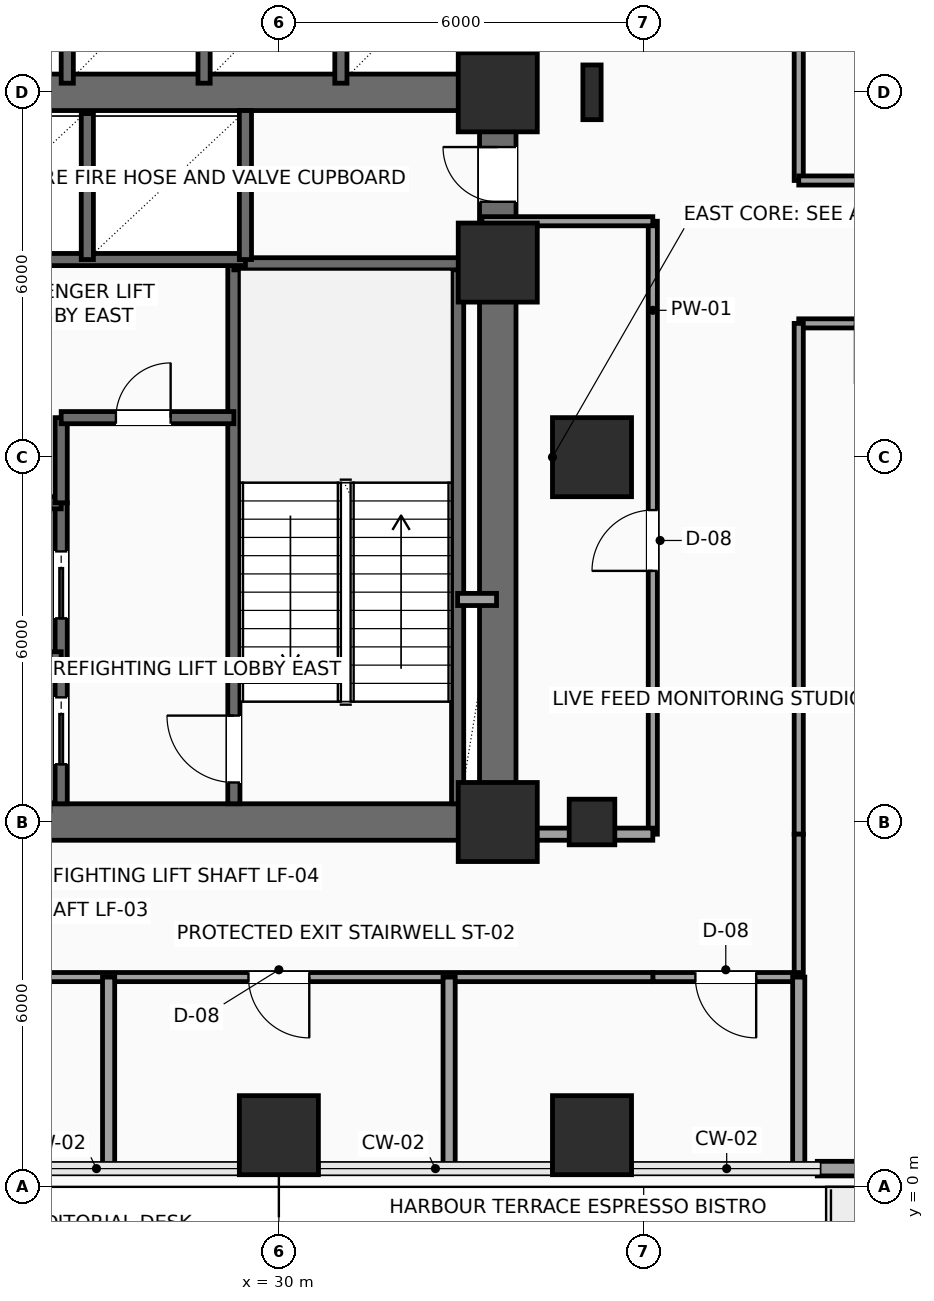
"""IFC4 building model, lengths in metres.
Left out: names, types, materials, properties, quantities, classifications, styles, units other than length and angle.
Written with IfcOpenShell. Run it as: python <this file> out.ifc"""

import sys

from ifc_helpers import new_model, si_unit, direction, frame, frame_2d, origin, origin_2d, place, context, subcontext, project, spatial, rectangle, hollow_rectangle, i_section, extrude, element, fill, save


model = new_model("IFC4")
c1 = context("Model", 3, precision=1e-05, world=origin(), true_north=direction((0.0, 1.0)))
c2 = subcontext(c1, "Body", "Model", "MODEL_VIEW")
j1 = project(units=[si_unit("LENGTHUNIT", "METRE"), si_unit("PLANEANGLEUNIT", "RADIAN")], contexts=[c1])
p1 = place(None, origin())
s1 = spatial("IfcSite", under=j1, at=p1, CompositionType="ELEMENT")
p2 = place(p1, origin())
s2 = spatial("IfcBuilding", under=s1, at=p2, CompositionType="ELEMENT")
p3 = place(p2, frame((0.0, 0.0, 71.4)))
s3 = spatial("IfcBuildingStorey", under=s2, at=p3, CompositionType="ELEMENT", Elevation=71.4)
for number, where, z_axis, x_axis in (
    (1, (33.6, 6.0, 0.0), (0.0, 0.0, 1.0), (1.0, 0.0, 0.0)),
    (2, (33.6, 15.2, 0.0), (0.0, 0.0, 1.0), (1.0, 0.0, 0.0)),
    (3, (33.6, 18.0, 0.0), (0.0, 0.0, 1.0), (1.0, 0.0, 0.0)),
    (4, (30.0, 0.85, 0.0), (0.0, 0.0, 1.0), (1.0, 0.0, 0.0)),
    (5, (35.15, 0.85, 0.0), (0.0, 0.0, 1.0), (1.0, 0.0, 0.0)),
):
    element("IfcColumn", number, at=place(p3, frame(where, z_axis=z_axis, x_axis=x_axis)), inside=s3, PredefinedType="COLUMN", context=c2, shape_type="SweptSolid", body=[
        extrude(rectangle(XDim=1.3, YDim=1.3, at=origin_2d()), origin(), (0.0, 0.0, 1.0), 3.9),
    ])
p4 = place(p3, frame((35.15, 6.0, 0.0), z_axis=(0.0, 0.0, 1.0), x_axis=(1.0, 0.0, 0.0)))
e6 = element("IfcColumn", 6, at=p4, inside=s3, PredefinedType="COLUMN", context=c2, shape_type="SweptSolid", body=[
    extrude(hollow_rectangle(XDim=0.75, YDim=0.75, WallThickness=0.035, InnerFilletRadius=0.035, OuterFilletRadius=0.05, at=origin_2d()), origin(), (0.0, 0.0, 1.0), 3.9),
])
p5 = place(p3, frame((35.15, 12.0, 0.0), z_axis=(0.0, 0.0, 1.0), x_axis=(1.0, 0.0, 0.0)))
e7 = element("IfcColumn", 7, at=p5, inside=s3, PredefinedType="COLUMN", context=c2, shape_type="SweptSolid", body=[
    extrude(rectangle(XDim=1.3, YDim=1.3, at=origin_2d()), origin(), (0.0, 0.0, 1.0), 3.9),
])
p6 = place(p3, frame((35.15, 18.0, 0.0), z_axis=(0.0, 0.0, 1.0), x_axis=(1.0, 0.0, 0.0)))
e8 = element("IfcColumn", 8, at=p6, inside=s3, PredefinedType="COLUMN", context=c2, shape_type="SweptSolid", body=[
    extrude(i_section(OverallWidth=0.3, OverallDepth=0.9, WebThickness=0.019, FlangeThickness=0.035, FilletRadius=0.03, at=origin_2d()), origin(), (0.0, 0.0, 1.0), 3.9),
])
p7 = place(p3, frame((48.145, 0.3, 0.0), z_axis=(0.0, 0.0, 1.0), x_axis=(-1.0, 0.0, 0.0)))
e9 = element("IfcWall", 9, at=p7, inside=s3, PredefinedType="SOLIDWALL", context=c2, shape_type="SweptSolid", body=[
    extrude(rectangle(XDim=9.29, YDim=0.24, at=frame_2d((4.645, 0.0))), origin(), (0.0, 0.0, 1.0), 3.65),
])
p8 = place(p7, frame((3.945, 0.0, 0.0)))
e10 = element("IfcOpeningElement", 10, at=p8, cuts=e9, PredefinedType="OPENING", context=c2, shape_type="SweptSolid", body=[
    extrude(rectangle(XDim=1.05, YDim=2.2, at=frame_2d((0.525, 1.1))), frame((0.0, 0.13, 0.0), z_axis=(0.0, -1.0, 0.0), x_axis=(1.0, 0.0, 0.0)), (0.0, 0.0, 1.0), 0.26),
])
for number, where, z_axis, x_axis in (
    (11, (24.0, 6.0, 0.0), (0.0, 0.0, 1.0), (1.0, 0.0, 0.0)),
    (12, (24.0, 18.0, 0.0), (0.0, 0.0, 1.0), (1.0, 0.0, 0.0)),
):
    element("IfcWall", number, at=place(p3, frame(where, z_axis=z_axis, x_axis=x_axis)), inside=s3, PredefinedType="SHEAR", context=c2, shape_type="SweptSolid", body=[
        extrude(rectangle(XDim=9.6, YDim=0.6, at=frame_2d((4.8, 0.0))), origin(), (0.0, 0.0, 1.0), 3.65),
    ])
p9 = place(p3, frame((33.6, 6.0, 0.0), z_axis=(0.0, 0.0, 1.0), x_axis=(0.0, 1.0, 0.0)))
e13 = element("IfcWall", 13, at=p9, inside=s3, PredefinedType="SHEAR", context=c2, shape_type="SweptSolid", body=[
    extrude(rectangle(XDim=12.0, YDim=0.6, at=frame_2d((6.0, 0.0))), origin(), (0.0, 0.0, 1.0), 3.65),
])
p10 = place(p9, frame((10.2, 0.0, 0.0)))
e14 = element("IfcOpeningElement", 14, at=p10, cuts=e13, PredefinedType="OPENING", context=c2, shape_type="SweptSolid", body=[
    extrude(rectangle(XDim=0.9, YDim=2.15, at=frame_2d((0.45, 1.075))), frame((0.0, 0.31, 0.0), z_axis=(0.0, -1.0, 0.0), x_axis=(1.0, 0.0, 0.0)), (0.0, 0.0, 1.0), 0.62),
])
p11 = place(p3, frame((29.26, 6.3, 0.0), z_axis=(0.0, 0.0, 1.0), x_axis=(0.0, 1.0, 0.0)))
e15 = element("IfcWall", 15, at=p11, inside=s3, PredefinedType="SHEAR", context=c2, shape_type="SweptSolid", body=[
    extrude(rectangle(XDim=8.88, YDim=0.2, at=frame_2d((4.44, 0.0))), origin(), (0.0, 0.0, 1.0), 3.65),
])
p12 = place(p11, frame((0.35, 0.0, 0.0)))
e16 = element("IfcOpeningElement", 16, at=p12, cuts=e15, PredefinedType="OPENING", context=c2, shape_type="SweptSolid", body=[
    extrude(rectangle(XDim=1.1, YDim=2.2, at=frame_2d((0.55, 1.1))), frame((0.0, 0.11, 0.0), z_axis=(0.0, -1.0, 0.0), x_axis=(1.0, 0.0, 0.0)), (0.0, 0.0, 1.0), 0.22),
])
p13 = place(p3, frame((32.94, 6.3, 0.0), z_axis=(0.0, 0.0, 1.0), x_axis=(0.0, 1.0, 0.0)))
e17 = element("IfcWall", 17, at=p13, inside=s3, PredefinedType="SHEAR", context=c2, shape_type="SweptSolid", body=[
    extrude(rectangle(XDim=8.88, YDim=0.2, at=frame_2d((4.44, 0.0))), origin(), (0.0, 0.0, 1.0), 3.65),
])
p14 = place(p3, frame((29.26, 15.18, 0.0), z_axis=(0.0, 0.0, 1.0), x_axis=(1.0, 0.0, 0.0)))
e18 = element("IfcWall", 18, at=p14, inside=s3, PredefinedType="SHEAR", context=c2, shape_type="SweptSolid", body=[
    extrude(rectangle(XDim=4.04, YDim=0.2, at=frame_2d((2.02, 0.0))), origin(), (0.0, 0.0, 1.0), 3.65),
])
p15 = place(p3, frame((26.42, 6.3, 0.0), z_axis=(0.0, 0.0, 1.0), x_axis=(0.0, 1.0, 0.0)))
e19 = element("IfcWall", 19, at=p15, inside=s3, PredefinedType="SHEAR", context=c2, shape_type="SweptSolid", body=[
    extrude(rectangle(XDim=4.95, YDim=0.2, at=frame_2d((2.475, 0.0))), origin(), (0.0, 0.0, 1.0), 3.65),
])
p16 = place(p15, frame((0.65, 0.0, 0.0)))
e20 = element("IfcOpeningElement", 20, at=p16, cuts=e19, PredefinedType="OPENING", context=c2, shape_type="SweptSolid", body=[
    extrude(rectangle(XDim=1.1, YDim=2.2, at=frame_2d((0.55, 1.1))), frame((0.0, 0.11, 0.0), z_axis=(0.0, -1.0, 0.0), x_axis=(1.0, 0.0, 0.0)), (0.0, 0.0, 1.0), 0.22),
])
p17 = place(p15, frame((3.05, 0.0, 0.0)))
e21 = element("IfcOpeningElement", 21, at=p17, cuts=e19, PredefinedType="OPENING", context=c2, shape_type="SweptSolid", body=[
    extrude(rectangle(XDim=1.1, YDim=2.2, at=frame_2d((0.55, 1.1))), frame((0.0, 0.11, 0.0), z_axis=(0.0, -1.0, 0.0), x_axis=(1.0, 0.0, 0.0)), (0.0, 0.0, 1.0), 0.22),
])
for number, where, z_axis, x_axis in (
    (22, (24.25, 8.7, 0.0), (0.0, 0.0, 1.0), (1.0, 0.0, 0.0)),
    (23, (24.25, 11.25, 0.0), (0.0, 0.0, 1.0), (1.0, 0.0, 0.0)),
):
    element("IfcWall", number, at=place(p3, frame(where, z_axis=z_axis, x_axis=x_axis)), inside=s3, PredefinedType="SHEAR", context=c2, shape_type="SweptSolid", body=[
        extrude(rectangle(XDim=2.17, YDim=0.2, at=frame_2d((1.085, 0.0))), origin(), (0.0, 0.0, 1.0), 3.65),
    ])
p18 = place(p3, frame((26.42, 11.25, 0.0), z_axis=(0.0, 0.0, 1.0), x_axis=(0.0, 1.0, 0.0)))
e24 = element("IfcWall", 24, at=p18, inside=s3, PredefinedType="SHEAR", context=c2, shape_type="SweptSolid", body=[
    extrude(rectangle(XDim=1.4, YDim=0.2, at=frame_2d((0.7, 0.0))), origin(), (0.0, 0.0, 1.0), 3.65),
])
p19 = place(p3, frame((26.42, 12.65, 0.0), z_axis=(0.0, 0.0, 1.0), x_axis=(1.0, 0.0, 0.0)))
e25 = element("IfcWall", 25, at=p19, inside=s3, PredefinedType="SHEAR", context=c2, shape_type="SweptSolid", body=[
    extrude(rectangle(XDim=2.84, YDim=0.2, at=frame_2d((1.42, 0.0))), origin(), (0.0, 0.0, 1.0), 3.65),
])
p20 = place(p19, frame((0.9, 0.0, 0.0)))
e26 = element("IfcOpeningElement", 26, at=p20, cuts=e25, PredefinedType="OPENING", context=c2, shape_type="SweptSolid", body=[
    extrude(rectangle(XDim=0.9, YDim=2.15, at=frame_2d((0.45, 1.075))), frame((0.0, 0.11, 0.0), z_axis=(0.0, -1.0, 0.0), x_axis=(1.0, 0.0, 0.0)), (0.0, 0.0, 1.0), 0.22),
])
p21 = place(p3, frame((32.94, 9.66, 0.0), z_axis=(0.0, 0.0, 1.0), x_axis=(1.0, 0.0, 0.0)))
e27 = element("IfcWall", 27, at=p21, inside=s3, PredefinedType="SOLIDWALL", context=c2, shape_type="SweptSolid", body=[
    extrude(rectangle(XDim=0.64, YDim=0.2, at=frame_2d((0.32, 0.0))), origin(), (0.0, 0.0, 1.0), 3.65),
])
p22 = place(p3, frame((24.25, 15.25, 0.0), z_axis=(0.0, 0.0, 1.0), x_axis=(1.0, 0.0, 0.0)))
e28 = element("IfcWall", 28, at=p22, inside=s3, PredefinedType="SHEAR", context=c2, shape_type="SweptSolid", body=[
    extrude(rectangle(XDim=5.2, YDim=0.2, at=frame_2d((2.6, 0.0))), origin(), (0.0, 0.0, 1.0), 3.65),
])
p23 = place(p3, frame((26.85, 15.25, 0.0), z_axis=(0.0, 0.0, 1.0), x_axis=(0.0, 1.0, 0.0)))
e29 = element("IfcWall", 29, at=p23, inside=s3, PredefinedType="SHEAR", context=c2, shape_type="SweptSolid", body=[
    extrude(rectangle(XDim=2.4, YDim=0.2, at=frame_2d((1.2, 0.0))), origin(), (0.0, 0.0, 1.0), 3.65),
])
p24 = place(p3, frame((29.45, 15.25, 0.0), z_axis=(0.0, 0.0, 1.0), x_axis=(0.0, 1.0, 0.0)))
e30 = element("IfcWall", 30, at=p24, inside=s3, PredefinedType="SHEAR", context=c2, shape_type="SweptSolid", body=[
    extrude(rectangle(XDim=2.45, YDim=0.2, at=frame_2d((1.225, 0.0))), origin(), (0.0, 0.0, 1.0), 3.65),
])
p25 = place(p3, frame((33.3, 18.1, 0.0), z_axis=(0.0, 0.0, 1.0), x_axis=(0.0, 1.0, 0.0)))
e31 = element("IfcWall", 31, at=p25, inside=s3, PredefinedType="SHEAR", context=c2, shape_type="SweptSolid", body=[
    extrude(rectangle(XDim=2.35, YDim=0.2, at=frame_2d((1.175, 0.0))), origin(), (0.0, 0.0, 1.0), 3.65),
])
for number, where, z_axis, x_axis in (
    (32, (26.52, 18.15, 0.0), (0.0, 0.0, 1.0), (0.0, 1.0, 0.0)),
    (33, (28.77, 18.15, 0.0), (0.0, 0.0, 1.0), (0.0, 1.0, 0.0)),
    (34, (31.02, 18.15, 0.0), (0.0, 0.0, 1.0), (0.0, 1.0, 0.0)),
):
    element("IfcWall", number, at=place(p3, frame(where, z_axis=z_axis, x_axis=x_axis)), inside=s3, PredefinedType="SHEAR", context=c2, shape_type="SweptSolid", body=[
        extrude(rectangle(XDim=2.3, YDim=0.2, at=frame_2d((1.15, 0.0))), origin(), (0.0, 0.0, 1.0), 3.65),
    ])
p26 = place(p3, frame((36.15, 5.8, 0.0), z_axis=(0.0, 0.0, 1.0), x_axis=(0.0, 1.0, 0.0)))
e35 = element("IfcWall", 35, at=p26, inside=s3, PredefinedType="PARTITIONING", context=c2, shape_type="SweptSolid", body=[
    extrude(rectangle(XDim=10.08, YDim=0.15, at=frame_2d((5.04, 0.0))), origin(), (0.0, 0.0, 1.0), 3.65),
])
p27 = place(p26, frame((4.33, 0.0, 0.0)))
e36 = element("IfcOpeningElement", 36, at=p27, cuts=e35, PredefinedType="OPENING", context=c2, shape_type="SweptSolid", body=[
    extrude(rectangle(XDim=1.0, YDim=2.2, at=frame_2d((0.5, 1.1))), frame((0.0, 0.085, 0.0), z_axis=(0.0, -1.0, 0.0), x_axis=(1.0, 0.0, 0.0)), (0.0, 0.0, 1.0), 0.17),
])
p28 = place(p3, frame((36.15, 15.88, 0.0), z_axis=(0.0, 0.0, 1.0), x_axis=(-1.0, 0.0, 0.0)))
e37 = element("IfcWall", 37, at=p28, inside=s3, PredefinedType="PARTITIONING", context=c2, shape_type="SweptSolid", body=[
    extrude(rectangle(XDim=2.81, YDim=0.15, at=frame_2d((1.405, 0.0))), origin(), (0.0, 0.0, 1.0), 3.65),
])
p29 = place(p3, frame((38.55, 23.7, 0.0), z_axis=(0.0, 0.0, 1.0), x_axis=(0.0, -1.0, 0.0)))
e38 = element("IfcWall", 38, at=p29, inside=s3, PredefinedType="PARTITIONING", context=c2, shape_type="SweptSolid", body=[
    extrude(rectangle(XDim=7.15, YDim=0.15, at=frame_2d((3.575, 0.0))), origin(), (0.0, 0.0, 1.0), 3.65),
])
p30 = place(p3, frame((38.55, 16.55, 0.0), z_axis=(0.0, 0.0, 1.0), x_axis=(1.0, 0.0, 0.0)))
e39 = element("IfcWall", 39, at=p30, inside=s3, PredefinedType="PARTITIONING", context=c2, shape_type="SweptSolid", body=[
    extrude(rectangle(XDim=12.35, YDim=0.15, at=frame_2d((6.175, 0.0))), origin(), (0.0, 0.0, 1.0), 3.65),
])
p31 = place(p30, frame((3.23, 0.0, 0.0)))
e40 = element("IfcOpeningElement", 40, at=p31, cuts=e39, PredefinedType="OPENING", context=c2, shape_type="SweptSolid", body=[
    extrude(rectangle(XDim=1.0, YDim=2.2, at=frame_2d((0.5, 1.1))), frame((0.0, 0.085, 0.0), z_axis=(0.0, -1.0, 0.0), x_axis=(1.0, 0.0, 0.0)), (0.0, 0.0, 1.0), 0.17),
])
p32 = place(p30, frame((9.28, 0.0, 0.0)))
e41 = element("IfcOpeningElement", 41, at=p32, cuts=e39, PredefinedType="OPENING", context=c2, shape_type="SweptSolid", body=[
    extrude(rectangle(XDim=1.0, YDim=2.2, at=frame_2d((0.5, 1.1))), frame((0.0, 0.085, 0.0), z_axis=(0.0, -1.0, 0.0), x_axis=(1.0, 0.0, 0.0)), (0.0, 0.0, 1.0), 0.17),
])
p33 = place(p3, frame((50.9, 14.2, 0.0), z_axis=(0.0, 0.0, 1.0), x_axis=(-1.0, 0.0, 0.0)))
e42 = element("IfcWall", 42, at=p33, inside=s3, PredefinedType="PARTITIONING", context=c2, shape_type="SweptSolid", body=[
    extrude(rectangle(XDim=12.35, YDim=0.15, at=frame_2d((6.175, 0.0))), origin(), (0.0, 0.0, 1.0), 3.65),
])
p34 = place(p33, frame((10.425, 0.0, 0.0)))
e43 = element("IfcOpeningElement", 43, at=p34, cuts=e42, PredefinedType="OPENING", context=c2, shape_type="SweptSolid", body=[
    extrude(rectangle(XDim=1.0, YDim=2.2, at=frame_2d((0.5, 1.1))), frame((0.0, 0.085, 0.0), z_axis=(0.0, -1.0, 0.0), x_axis=(1.0, 0.0, 0.0)), (0.0, 0.0, 1.0), 0.17),
])
p35 = place(p33, frame((5.9, 0.0, 0.0)))
e44 = element("IfcOpeningElement", 44, at=p35, cuts=e42, PredefinedType="OPENING", context=c2, shape_type="SweptSolid", body=[
    extrude(rectangle(XDim=1.0, YDim=2.2, at=frame_2d((0.5, 1.1))), frame((0.0, 0.085, 0.0), z_axis=(0.0, -1.0, 0.0), x_axis=(1.0, 0.0, 0.0)), (0.0, 0.0, 1.0), 0.17),
])
p36 = place(p33, frame((1.15, 0.0, 0.0)))
e45 = element("IfcOpeningElement", 45, at=p36, cuts=e42, PredefinedType="OPENING", context=c2, shape_type="SweptSolid", body=[
    extrude(rectangle(XDim=1.0, YDim=2.2, at=frame_2d((0.5, 1.1))), frame((0.0, 0.085, 0.0), z_axis=(0.0, -1.0, 0.0), x_axis=(1.0, 0.0, 0.0)), (0.0, 0.0, 1.0), 0.17),
])
p37 = place(p3, frame((38.55, 14.2, 0.0), z_axis=(0.0, 0.0, 1.0), x_axis=(0.0, -1.0, 0.0)))
e46 = element("IfcWall", 46, at=p37, inside=s3, PredefinedType="PARTITIONING", context=c2, shape_type="SweptSolid", body=[
    extrude(rectangle(XDim=8.4, YDim=0.15, at=frame_2d((4.2, 0.0))), origin(), (0.0, 0.0, 1.0), 3.65),
])
p38 = place(p3, frame((38.55, 5.8, 0.0), z_axis=(0.0, 0.0, 1.0), x_axis=(0.0, -1.0, 0.0)))
e47 = element("IfcWall", 47, at=p38, inside=s3, PredefinedType="PARTITIONING", context=c2, shape_type="SweptSolid", body=[
    extrude(rectangle(XDim=2.35, YDim=0.15, at=frame_2d((1.175, 0.0))), origin(), (0.0, 0.0, 1.0), 3.65),
])
p39 = place(p3, frame((38.55, 3.45, 0.0), z_axis=(0.0, 0.0, 1.0), x_axis=(-1.0, 0.0, 0.0)))
e48 = element("IfcWall", 48, at=p39, inside=s3, PredefinedType="PARTITIONING", context=c2, shape_type="SweptSolid", body=[
    extrude(rectangle(XDim=2.4, YDim=0.15, at=frame_2d((1.2, 0.0))), origin(), (0.0, 0.0, 1.0), 3.142),
])
p40 = place(p39, frame((0.7, 0.0, 0.0)))
e49 = element("IfcOpeningElement", 49, at=p40, cuts=e48, PredefinedType="OPENING", context=c2, shape_type="SweptSolid", body=[
    extrude(rectangle(XDim=1.0, YDim=2.2, at=frame_2d((0.5, 1.1))), frame((0.0, 0.085, 0.0), z_axis=(0.0, -1.0, 0.0), x_axis=(1.0, 0.0, 0.0)), (0.0, 0.0, 1.0), 0.17),
])
p41 = place(p3, frame((36.15, 3.45, 0.0), z_axis=(0.0, 0.0, 1.0), x_axis=(-1.0, 0.0, 0.0)))
e50 = element("IfcWall", 50, at=p41, inside=s3, PredefinedType="PARTITIONING", context=c2, shape_type="SweptSolid", body=[
    extrude(rectangle(XDim=14.6, YDim=0.15, at=frame_2d((7.3, 0.0))), origin(), (0.0, 0.0, 1.0), 3.142),
])
p42 = place(p41, frame((11.275, 0.0, 0.0)))
e51 = element("IfcOpeningElement", 51, at=p42, cuts=e50, PredefinedType="OPENING", context=c2, shape_type="SweptSolid", body=[
    extrude(rectangle(XDim=1.0, YDim=2.2, at=frame_2d((0.5, 1.1))), frame((0.0, 0.085, 0.0), z_axis=(0.0, -1.0, 0.0), x_axis=(1.0, 0.0, 0.0)), (0.0, 0.0, 1.0), 0.17),
])
p43 = place(p41, frame((5.65, 0.0, 0.0)))
e52 = element("IfcOpeningElement", 52, at=p43, cuts=e50, PredefinedType="OPENING", context=c2, shape_type="SweptSolid", body=[
    extrude(rectangle(XDim=1.0, YDim=2.2, at=frame_2d((0.5, 1.1))), frame((0.0, 0.085, 0.0), z_axis=(0.0, -1.0, 0.0), x_axis=(1.0, 0.0, 0.0)), (0.0, 0.0, 1.0), 0.17),
])
for number, where, z_axis, x_axis in (
    (53, (27.2, 0.3, 0.0), (0.0, 0.0, 1.0), (0.0, 1.0, 0.0)),
    (54, (32.8, 0.3, 0.0), (0.0, 0.0, 1.0), (0.0, 1.0, 0.0)),
    (55, (38.55, 0.3, 0.0), (0.0, 0.0, 1.0), (0.0, 1.0, 0.0)),
):
    element("IfcWall", number, at=place(p3, frame(where, z_axis=z_axis, x_axis=x_axis)), inside=s3, PredefinedType="PARTITIONING", context=c2, shape_type="SweptSolid", body=[
        extrude(rectangle(XDim=3.15, YDim=0.2, at=frame_2d((1.575, 0.0))), origin(), (0.0, 0.0, 1.0), 3.65),
    ])
p44 = place(p3, frame((33.65, 5.8, 0.0), z_axis=(0.0, 0.0, 1.0), x_axis=(1.0, 0.0, 0.0)))
e56 = element("IfcWall", 56, at=p44, inside=s3, PredefinedType="PARTITIONING", context=c2, shape_type="SweptSolid", body=[
    extrude(rectangle(XDim=2.5, YDim=0.2, at=frame_2d((1.25, 0.0))), origin(), (0.0, 0.0, 1.0), 2.992),
])
p45 = place(p10, origin())
e57 = element("IfcDoor", 57, at=p45, inside=s3, OperationType="SINGLE_SWING_RIGHT", PredefinedType="DOOR", context=c2, shape_type="SweptSolid", body=[
    extrude(rectangle(XDim=0.9, YDim=2.15, at=frame_2d((0.45, 1.075))), frame((0.0, 0.025, 0.0), z_axis=(0.0, -1.0, 0.0), x_axis=(1.0, 0.0, 0.0)), (0.0, 0.0, 1.0), 0.05),
])
fill(e14, e57)
p46 = place(p12, origin())
e58 = element("IfcDoor", 58, at=p46, inside=s3, OperationType="SINGLE_SWING_RIGHT", PredefinedType="DOOR", context=c2, shape_type="SweptSolid", body=[
    extrude(rectangle(XDim=1.1, YDim=2.2, at=frame_2d((0.55, 1.1))), frame((0.0, 0.025, 0.0), z_axis=(0.0, -1.0, 0.0), x_axis=(1.0, 0.0, 0.0)), (0.0, 0.0, 1.0), 0.05),
])
fill(e16, e58)
p47 = place(p16, origin())
e59 = element("IfcDoor", 59, at=p47, inside=s3, OperationType="SLIDING_TO_LEFT", PredefinedType="DOOR", context=c2, shape_type="SweptSolid", body=[
    extrude(rectangle(XDim=1.1, YDim=2.2, at=frame_2d((0.55, 1.1))), frame((0.0, 0.025, 0.0), z_axis=(0.0, -1.0, 0.0), x_axis=(1.0, 0.0, 0.0)), (0.0, 0.0, 1.0), 0.05),
])
fill(e20, e59)
p48 = place(p17, origin())
e60 = element("IfcDoor", 60, at=p48, inside=s3, OperationType="SLIDING_TO_LEFT", PredefinedType="DOOR", context=c2, shape_type="SweptSolid", body=[
    extrude(rectangle(XDim=1.1, YDim=2.2, at=frame_2d((0.55, 1.1))), frame((0.0, 0.025, 0.0), z_axis=(0.0, -1.0, 0.0), x_axis=(1.0, 0.0, 0.0)), (0.0, 0.0, 1.0), 0.05),
])
fill(e21, e60)
p49 = place(p20, origin())
e61 = element("IfcDoor", 61, at=p49, inside=s3, OperationType="SINGLE_SWING_RIGHT", PredefinedType="DOOR", context=c2, shape_type="SweptSolid", body=[
    extrude(rectangle(XDim=0.9, YDim=2.15, at=frame_2d((0.45, 1.075))), frame((0.0, 0.025, 0.0), z_axis=(0.0, -1.0, 0.0), x_axis=(1.0, 0.0, 0.0)), (0.0, 0.0, 1.0), 0.05),
])
fill(e26, e61)
p50 = place(p27, origin())
e62 = element("IfcDoor", 62, at=p50, inside=s3, OperationType="SINGLE_SWING_LEFT", PredefinedType="DOOR", context=c2, shape_type="SweptSolid", body=[
    extrude(rectangle(XDim=1.0, YDim=2.2, at=frame_2d((0.5, 1.1))), frame((0.0, 0.025, 0.0), z_axis=(0.0, -1.0, 0.0), x_axis=(1.0, 0.0, 0.0)), (0.0, 0.0, 1.0), 0.05),
])
fill(e36, e62)
p51 = place(p40, origin())
e63 = element("IfcDoor", 63, at=p51, inside=s3, OperationType="SINGLE_SWING_LEFT", PredefinedType="DOOR", context=c2, shape_type="SweptSolid", body=[
    extrude(rectangle(XDim=1.0, YDim=2.2, at=frame_2d((0.5, 1.1))), frame((0.0, 0.025, 0.0), z_axis=(0.0, -1.0, 0.0), x_axis=(1.0, 0.0, 0.0)), (0.0, 0.0, 1.0), 0.05),
])
fill(e49, e63)
p52 = place(p43, origin())
e64 = element("IfcDoor", 64, at=p52, inside=s3, OperationType="SINGLE_SWING_LEFT", PredefinedType="DOOR", context=c2, shape_type="SweptSolid", body=[
    extrude(rectangle(XDim=1.0, YDim=2.2, at=frame_2d((0.5, 1.1))), frame((0.0, 0.025, 0.0), z_axis=(0.0, -1.0, 0.0), x_axis=(1.0, 0.0, 0.0)), (0.0, 0.0, 1.0), 0.05),
])
fill(e52, e64)
save(model, sys.argv[1])
